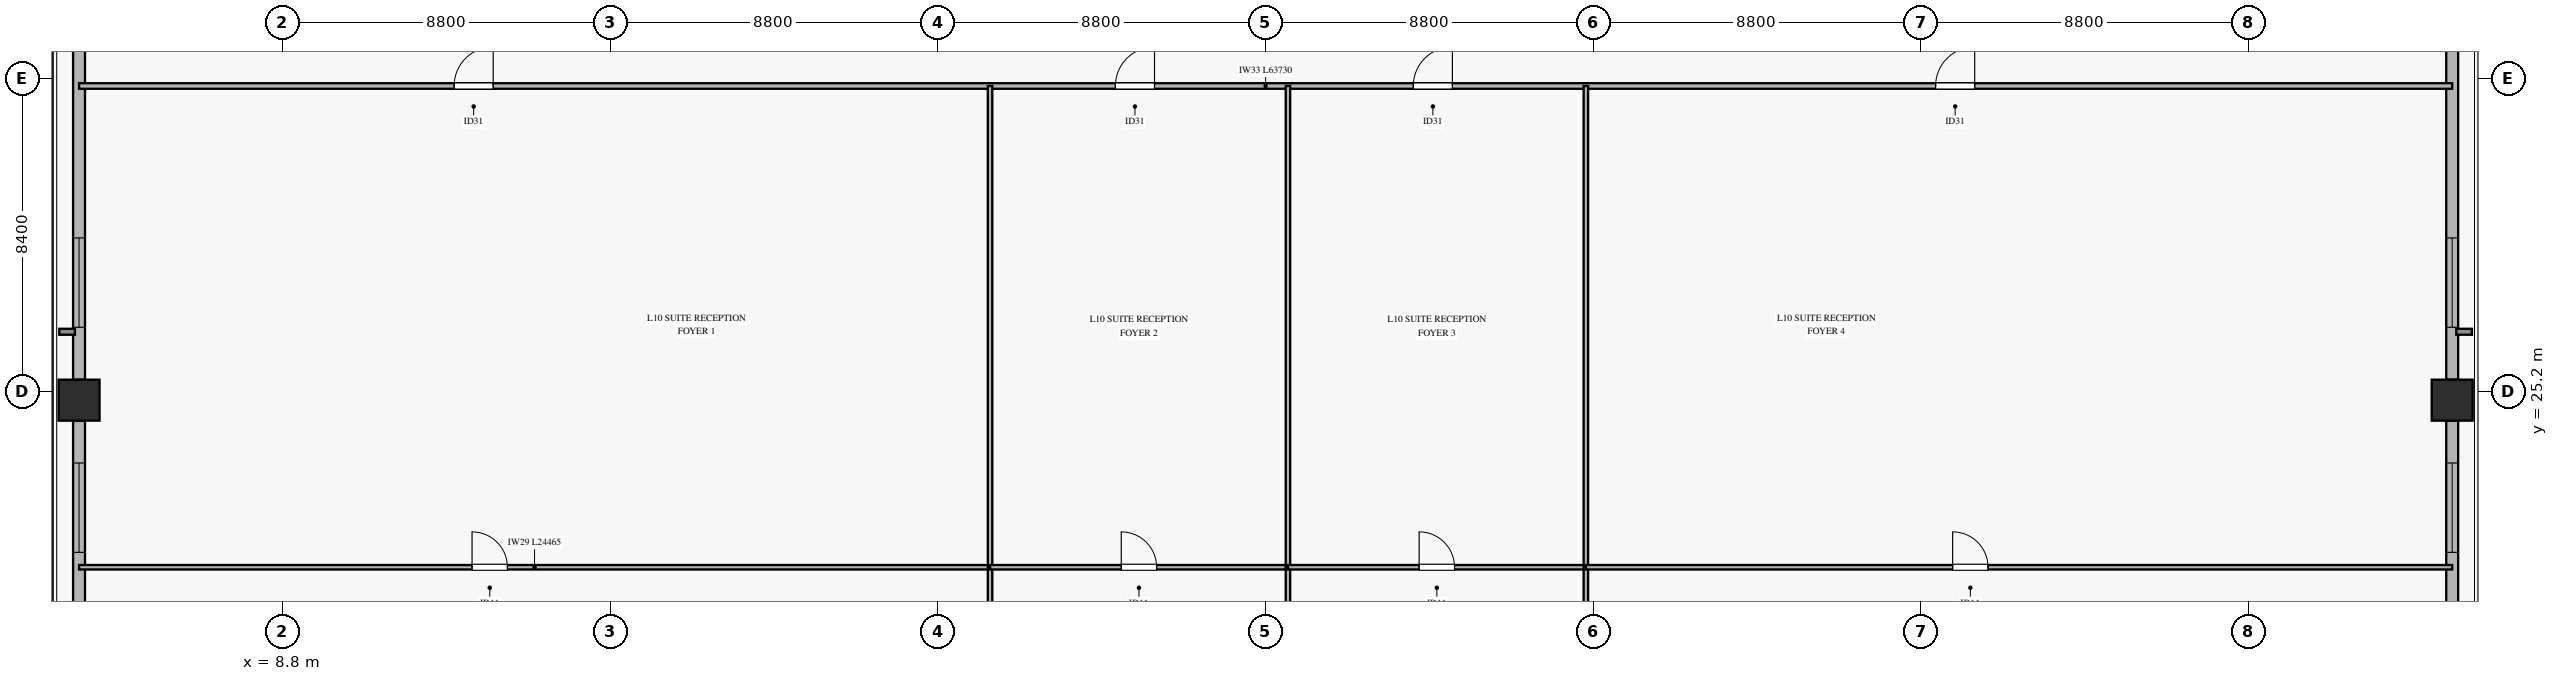
"""IFC4 building model, lengths in metres.
Left out: names, types, materials, properties, quantities, classifications, styles, units other than length and angle.
Written with IfcOpenShell. Run it as: python <this file> out.ifc"""

import sys

from ifc_helpers import new_model, si_unit, direction, frame, frame_2d, origin, origin_2d, place, context, subcontext, project, spatial, rectangle, hollow_rectangle, extrude, source, transform, mapped, element, fill, save


model = new_model("IFC4")
c1 = context("Model", 3, precision=1e-05, world=origin(), true_north=direction((0.0, 1.0)))
c2 = subcontext(c1, "Body", "Model", "MODEL_VIEW")
j1 = project(units=[si_unit("LENGTHUNIT", "METRE"), si_unit("PLANEANGLEUNIT", "RADIAN")], contexts=[c1])
p1 = place(None, origin())
s1 = spatial("IfcSite", under=j1, at=p1, CompositionType="ELEMENT")
p2 = place(p1, origin())
s2 = spatial("IfcBuilding", under=s1, at=p2, CompositionType="ELEMENT")
p3 = place(p2, frame((0.0, 0.0, 41.0)))
s3 = spatial("IfcBuildingStorey", under=s2, at=p3, CompositionType="ELEMENT", Elevation=41.0)
m1 = source(origin(), c2, "Body", "SweptSolid", [
    extrude(hollow_rectangle(XDim=1.1, YDim=1.1, WallThickness=0.05, at=origin_2d()), origin(), (0.0, 0.0, 1.0), 3.68),
])
for number, where, z_axis, x_axis in (
    (1, (3.335, 24.963, 0.0), (0.0, 0.0, 1.0), (1.0, 0.0, 0.0)),
    (2, (67.065, 24.963, 0.0), (0.0, 0.0, 1.0), (1.0, 0.0, 0.0)),
):
    element("IfcColumn", number, at=place(p3, frame(where, z_axis=z_axis, x_axis=x_axis)), inside=s3, PredefinedType="COLUMN", context=c2, shape_type="MappedRepresentation", body=[
        mapped(m1, transform((0.0, 0.0, 0.0), x_axis=(1.0, 0.0, 0.0), y_axis=(0.0, 1.0, 0.0), z_axis=(0.0, 0.0, 1.0), scale=1.0)),
    ])
p4 = place(p3, frame((3.335, 7.001, 0.0), z_axis=(0.0, 0.0, 1.0), x_axis=(0.0, 1.0, 0.0)))
e3 = element("IfcWall", 3, at=p4, inside=s3, PredefinedType="SOLIDWALL", context=c2, shape_type="SweptSolid", body=[
    extrude(rectangle(XDim=17.412, YDim=0.32, at=frame_2d((8.706, 0.0))), origin(), (0.0, 0.0, 1.0), 3.16),
])
p5 = place(p4, frame((3.567, 0.0, 0.45)))
e4 = element("IfcOpeningElement", 4, at=p5, cuts=e3, PredefinedType="OPENING", context=c2, shape_type="SweptSolid", body=[
    extrude(rectangle(XDim=2.4, YDim=2.1, at=frame_2d((1.2, 1.05))), frame((0.0, 0.17, 0.0), z_axis=(0.0, -1.0, 0.0), x_axis=(1.0, 0.0, 0.0)), (0.0, 0.0, 1.0), 0.34),
])
p6 = place(p4, frame((13.875, 0.0, 0.45)))
e5 = element("IfcOpeningElement", 5, at=p6, cuts=e3, PredefinedType="OPENING", context=c2, shape_type="SweptSolid", body=[
    extrude(rectangle(XDim=2.4, YDim=2.1, at=frame_2d((1.2, 1.05))), frame((0.0, 0.17, 0.0), z_axis=(0.0, -1.0, 0.0), x_axis=(1.0, 0.0, 0.0)), (0.0, 0.0, 1.0), 0.34),
])
p7 = place(p3, frame((3.335, 25.513, 0.0), z_axis=(0.0, 0.0, 1.0), x_axis=(0.0, 1.0, 0.0)))
e6 = element("IfcWall", 6, at=p7, inside=s3, PredefinedType="SOLIDWALL", context=c2, shape_type="SweptSolid", body=[
    extrude(rectangle(XDim=17.413, YDim=0.32, at=frame_2d((8.707, 0.0))), origin(), (0.0, 0.0, 1.0), 3.16),
])
p8 = place(p7, frame((1.407, 0.0, 0.45)))
e7 = element("IfcOpeningElement", 7, at=p8, cuts=e6, PredefinedType="OPENING", context=c2, shape_type="SweptSolid", body=[
    extrude(rectangle(XDim=2.4, YDim=2.1, at=frame_2d((1.2, 1.05))), frame((0.0, 0.17, 0.0), z_axis=(0.0, -1.0, 0.0), x_axis=(1.0, 0.0, 0.0)), (0.0, 0.0, 1.0), 0.34),
])
p9 = place(p7, frame((13.463, 0.0, 0.45)))
e8 = element("IfcOpeningElement", 8, at=p9, cuts=e6, PredefinedType="OPENING", context=c2, shape_type="SweptSolid", body=[
    extrude(rectangle(XDim=2.4, YDim=2.1, at=frame_2d((1.2, 1.05))), frame((0.0, 0.17, 0.0), z_axis=(0.0, -1.0, 0.0), x_axis=(1.0, 0.0, 0.0)), (0.0, 0.0, 1.0), 0.34),
])
p10 = place(p3, frame((67.065, 7.001, 0.0), z_axis=(0.0, 0.0, 1.0), x_axis=(0.0, 1.0, 0.0)))
e9 = element("IfcWall", 9, at=p10, inside=s3, PredefinedType="SOLIDWALL", context=c2, shape_type="SweptSolid", body=[
    extrude(rectangle(XDim=17.412, YDim=0.32, at=frame_2d((8.706, 0.0))), origin(), (0.0, 0.0, 1.0), 3.16),
])
p11 = place(p10, frame((3.567, 0.0, 0.45)))
e10 = element("IfcOpeningElement", 10, at=p11, cuts=e9, PredefinedType="OPENING", context=c2, shape_type="SweptSolid", body=[
    extrude(rectangle(XDim=2.4, YDim=2.1, at=frame_2d((1.2, 1.05))), frame((0.0, 0.17, 0.0), z_axis=(0.0, -1.0, 0.0), x_axis=(1.0, 0.0, 0.0)), (0.0, 0.0, 1.0), 0.34),
])
p12 = place(p10, frame((13.875, 0.0, 0.45)))
e11 = element("IfcOpeningElement", 11, at=p12, cuts=e9, PredefinedType="OPENING", context=c2, shape_type="SweptSolid", body=[
    extrude(rectangle(XDim=2.4, YDim=2.1, at=frame_2d((1.2, 1.05))), frame((0.0, 0.17, 0.0), z_axis=(0.0, -1.0, 0.0), x_axis=(1.0, 0.0, 0.0)), (0.0, 0.0, 1.0), 0.34),
])
p13 = place(p3, frame((67.065, 25.513, 0.0), z_axis=(0.0, 0.0, 1.0), x_axis=(0.0, 1.0, 0.0)))
e12 = element("IfcWall", 12, at=p13, inside=s3, PredefinedType="SOLIDWALL", context=c2, shape_type="SweptSolid", body=[
    extrude(rectangle(XDim=17.413, YDim=0.32, at=frame_2d((8.707, 0.0))), origin(), (0.0, 0.0, 1.0), 3.16),
])
p14 = place(p13, frame((1.407, 0.0, 0.45)))
e13 = element("IfcOpeningElement", 13, at=p14, cuts=e12, PredefinedType="OPENING", context=c2, shape_type="SweptSolid", body=[
    extrude(rectangle(XDim=2.4, YDim=2.1, at=frame_2d((1.2, 1.05))), frame((0.0, 0.17, 0.0), z_axis=(0.0, -1.0, 0.0), x_axis=(1.0, 0.0, 0.0)), (0.0, 0.0, 1.0), 0.34),
])
p15 = place(p13, frame((13.463, 0.0, 0.45)))
e14 = element("IfcOpeningElement", 14, at=p15, cuts=e12, PredefinedType="OPENING", context=c2, shape_type="SweptSolid", body=[
    extrude(rectangle(XDim=2.4, YDim=2.1, at=frame_2d((1.2, 1.05))), frame((0.0, 0.17, 0.0), z_axis=(0.0, -1.0, 0.0), x_axis=(1.0, 0.0, 0.0)), (0.0, 0.0, 1.0), 0.34),
])
p16 = place(p3, frame((3.335, 33.4, 0.0), z_axis=(0.0, 0.0, 1.0), x_axis=(1.0, 0.0, 0.0)))
e15 = element("IfcWall", 15, at=p16, inside=s3, PredefinedType="PARTITIONING", context=c2, shape_type="SweptSolid", body=[
    extrude(rectangle(XDim=63.73, YDim=0.15, at=frame_2d((31.865, 0.0))), origin(), (0.0, 0.0, 1.0), 2.765),
])
p17 = place(p16, frame((10.072, 0.0, 0.0)))
e16 = element("IfcOpeningElement", 16, at=p17, cuts=e15, PredefinedType="OPENING", context=c2, shape_type="SweptSolid", body=[
    extrude(rectangle(XDim=1.05, YDim=2.15, at=frame_2d((0.525, 1.075))), frame((0.0, 0.085, 0.0), z_axis=(0.0, -1.0, 0.0), x_axis=(1.0, 0.0, 0.0)), (0.0, 0.0, 1.0), 0.17),
])
p18 = place(p16, frame((27.831, 0.0, 0.0)))
e17 = element("IfcOpeningElement", 17, at=p18, cuts=e15, PredefinedType="OPENING", context=c2, shape_type="SweptSolid", body=[
    extrude(rectangle(XDim=1.05, YDim=2.15, at=frame_2d((0.525, 1.075))), frame((0.0, 0.085, 0.0), z_axis=(0.0, -1.0, 0.0), x_axis=(1.0, 0.0, 0.0)), (0.0, 0.0, 1.0), 0.17),
])
p19 = place(p16, frame((35.831, 0.0, 0.0)))
e18 = element("IfcOpeningElement", 18, at=p19, cuts=e15, PredefinedType="OPENING", context=c2, shape_type="SweptSolid", body=[
    extrude(rectangle(XDim=1.05, YDim=2.15, at=frame_2d((0.525, 1.075))), frame((0.0, 0.085, 0.0), z_axis=(0.0, -1.0, 0.0), x_axis=(1.0, 0.0, 0.0)), (0.0, 0.0, 1.0), 0.17),
])
p20 = place(p16, frame((49.857, 0.0, 0.0)))
e19 = element("IfcOpeningElement", 19, at=p20, cuts=e15, PredefinedType="OPENING", context=c2, shape_type="SweptSolid", body=[
    extrude(rectangle(XDim=1.05, YDim=2.15, at=frame_2d((0.525, 1.075))), frame((0.0, 0.085, 0.0), z_axis=(0.0, -1.0, 0.0), x_axis=(1.0, 0.0, 0.0)), (0.0, 0.0, 1.0), 0.17),
])
p21 = place(p3, frame((3.335, 20.476, 0.0), z_axis=(0.0, 0.0, 1.0), x_axis=(1.0, 0.0, 0.0)))
e20 = element("IfcWall", 20, at=p21, inside=s3, PredefinedType="PARTITIONING", context=c2, shape_type="SweptSolid", body=[
    extrude(rectangle(XDim=24.465, YDim=0.12, at=frame_2d((12.232, 0.0))), origin(), (0.0, 0.0, 1.0), 2.765),
])
p22 = place(p21, frame((10.554, 0.0, 0.0)))
e21 = element("IfcOpeningElement", 21, at=p22, cuts=e20, PredefinedType="OPENING", context=c2, shape_type="SweptSolid", body=[
    extrude(rectangle(XDim=0.95, YDim=2.1, at=frame_2d((0.475, 1.05))), frame((0.0, 0.07, 0.0), z_axis=(0.0, -1.0, 0.0), x_axis=(1.0, 0.0, 0.0)), (0.0, 0.0, 1.0), 0.14),
])
p23 = place(p3, frame((27.8, 3.827, 0.0), z_axis=(0.0, 0.0, 1.0), x_axis=(0.0, 1.0, 0.0)))
e22 = element("IfcWall", 22, at=p23, inside=s3, PredefinedType="PARTITIONING", context=c2, shape_type="SweptSolid", body=[
    extrude(rectangle(XDim=29.573, YDim=0.12, at=frame_2d((14.787, 0.0))), origin(), (0.0, 0.0, 1.0), 3.165),
])
p24 = place(p3, frame((27.8, 20.476, 0.0), z_axis=(0.0, 0.0, 1.0), x_axis=(1.0, 0.0, 0.0)))
e23 = element("IfcWall", 23, at=p24, inside=s3, PredefinedType="PARTITIONING", context=c2, shape_type="SweptSolid", body=[
    extrude(rectangle(XDim=8.0, YDim=0.12, at=frame_2d((4.0, 0.0))), origin(), (0.0, 0.0, 1.0), 2.765),
])
p25 = place(p24, frame((3.523, 0.0, 0.0)))
e24 = element("IfcOpeningElement", 24, at=p25, cuts=e23, PredefinedType="OPENING", context=c2, shape_type="SweptSolid", body=[
    extrude(rectangle(XDim=0.95, YDim=2.1, at=frame_2d((0.475, 1.05))), frame((0.0, 0.07, 0.0), z_axis=(0.0, -1.0, 0.0), x_axis=(1.0, 0.0, 0.0)), (0.0, 0.0, 1.0), 0.14),
])
p26 = place(p3, frame((35.8, 3.827, 0.0), z_axis=(0.0, 0.0, 1.0), x_axis=(0.0, 1.0, 0.0)))
e25 = element("IfcWall", 25, at=p26, inside=s3, PredefinedType="PARTITIONING", context=c2, shape_type="SweptSolid", body=[
    extrude(rectangle(XDim=29.573, YDim=0.12, at=frame_2d((14.787, 0.0))), origin(), (0.0, 0.0, 1.0), 3.165),
])
p27 = place(p3, frame((35.8, 20.476, 0.0), z_axis=(0.0, 0.0, 1.0), x_axis=(1.0, 0.0, 0.0)))
e26 = element("IfcWall", 26, at=p27, inside=s3, PredefinedType="PARTITIONING", context=c2, shape_type="SweptSolid", body=[
    extrude(rectangle(XDim=8.0, YDim=0.12, at=frame_2d((4.0, 0.0))), origin(), (0.0, 0.0, 1.0), 2.765),
])
p28 = place(p27, frame((3.523, 0.0, 0.0)))
e27 = element("IfcOpeningElement", 27, at=p28, cuts=e26, PredefinedType="OPENING", context=c2, shape_type="SweptSolid", body=[
    extrude(rectangle(XDim=0.95, YDim=2.1, at=frame_2d((0.475, 1.05))), frame((0.0, 0.07, 0.0), z_axis=(0.0, -1.0, 0.0), x_axis=(1.0, 0.0, 0.0)), (0.0, 0.0, 1.0), 0.14),
])
p29 = place(p3, frame((43.8, 3.827, 0.0), z_axis=(0.0, 0.0, 1.0), x_axis=(0.0, 1.0, 0.0)))
e28 = element("IfcWall", 28, at=p29, inside=s3, PredefinedType="PARTITIONING", context=c2, shape_type="SweptSolid", body=[
    extrude(rectangle(XDim=29.573, YDim=0.12, at=frame_2d((14.787, 0.0))), origin(), (0.0, 0.0, 1.0), 3.215),
])
p30 = place(p3, frame((43.8, 20.476, 0.0), z_axis=(0.0, 0.0, 1.0), x_axis=(1.0, 0.0, 0.0)))
e29 = element("IfcWall", 29, at=p30, inside=s3, PredefinedType="PARTITIONING", context=c2, shape_type="SweptSolid", body=[
    extrude(rectangle(XDim=23.265, YDim=0.12, at=frame_2d((11.632, 0.0))), origin(), (0.0, 0.0, 1.0), 2.765),
])
p31 = place(p30, frame((9.85, 0.0, 0.0)))
e30 = element("IfcOpeningElement", 30, at=p31, cuts=e29, PredefinedType="OPENING", context=c2, shape_type="SweptSolid", body=[
    extrude(rectangle(XDim=0.95, YDim=2.1, at=frame_2d((0.475, 1.05))), frame((0.0, 0.07, 0.0), z_axis=(0.0, -1.0, 0.0), x_axis=(1.0, 0.0, 0.0)), (0.0, 0.0, 1.0), 0.14),
])
m2 = source(origin(), c2, "Body", "SweptSolid", [
    extrude(rectangle(XDim=2.4, YDim=2.1, at=frame_2d((1.2, 1.05))), frame((0.0, 0.03, 0.0), z_axis=(0.0, -1.0, 0.0), x_axis=(1.0, 0.0, 0.0)), (0.0, 0.0, 1.0), 0.06),
])
p32 = place(p6, origin())
e31 = element("IfcWindow", 31, at=p32, inside=s3, PartitioningType="SINGLE_PANEL", PredefinedType="WINDOW", context=c2, shape_type="MappedRepresentation", body=[
    mapped(m2, transform((0.0, 0.0, 0.0), x_axis=(1.0, 0.0, 0.0), y_axis=(0.0, 1.0, 0.0), z_axis=(0.0, 0.0, 1.0), scale=1.0)),
])
fill(e5, e31)
p33 = place(p8, origin())
e32 = element("IfcWindow", 32, at=p33, inside=s3, PartitioningType="SINGLE_PANEL", PredefinedType="WINDOW", context=c2, shape_type="MappedRepresentation", body=[
    mapped(m2, transform((0.0, 0.0, 0.0), x_axis=(1.0, 0.0, 0.0), y_axis=(0.0, 1.0, 0.0), z_axis=(0.0, 0.0, 1.0), scale=1.0)),
])
fill(e7, e32)
p34 = place(p12, origin())
e33 = element("IfcWindow", 33, at=p34, inside=s3, PartitioningType="SINGLE_PANEL", PredefinedType="WINDOW", context=c2, shape_type="MappedRepresentation", body=[
    mapped(m2, transform((0.0, 0.0, 0.0), x_axis=(1.0, 0.0, 0.0), y_axis=(0.0, 1.0, 0.0), z_axis=(0.0, 0.0, 1.0), scale=1.0)),
])
fill(e11, e33)
p35 = place(p14, origin())
e34 = element("IfcWindow", 34, at=p35, inside=s3, PartitioningType="SINGLE_PANEL", PredefinedType="WINDOW", context=c2, shape_type="MappedRepresentation", body=[
    mapped(m2, transform((0.0, 0.0, 0.0), x_axis=(1.0, 0.0, 0.0), y_axis=(0.0, 1.0, 0.0), z_axis=(0.0, 0.0, 1.0), scale=1.0)),
])
fill(e13, e34)
m3 = source(origin(), c2, "Body", "SweptSolid", [
    extrude(rectangle(XDim=1.05, YDim=2.15, at=frame_2d((0.525, 1.075))), frame((0.0, 0.025, 0.0), z_axis=(0.0, -1.0, 0.0), x_axis=(1.0, 0.0, 0.0)), (0.0, 0.0, 1.0), 0.05),
])
p36 = place(p17, origin())
e35 = element("IfcDoor", 35, at=p36, inside=s3, OperationType="SINGLE_SWING_RIGHT", PredefinedType="DOOR", context=c2, shape_type="MappedRepresentation", body=[
    mapped(m3, transform((0.0, 0.0, 0.0), x_axis=(1.0, 0.0, 0.0), y_axis=(0.0, 1.0, 0.0), z_axis=(0.0, 0.0, 1.0), scale=1.0)),
])
fill(e16, e35)
m4 = source(origin(), c2, "Body", "SweptSolid", [
    extrude(rectangle(XDim=0.95, YDim=2.1, at=frame_2d((0.475, 1.05))), frame((0.0, 0.025, 0.0), z_axis=(0.0, -1.0, 0.0), x_axis=(1.0, 0.0, 0.0)), (0.0, 0.0, 1.0), 0.05),
])
p37 = place(p22, origin())
e36 = element("IfcDoor", 36, at=p37, inside=s3, OperationType="SINGLE_SWING_LEFT", PredefinedType="DOOR", context=c2, shape_type="MappedRepresentation", body=[
    mapped(m4, transform((0.0, 0.0, 0.0), x_axis=(1.0, 0.0, 0.0), y_axis=(0.0, 1.0, 0.0), z_axis=(0.0, 0.0, 1.0), scale=1.0)),
])
fill(e21, e36)
p38 = place(p18, origin())
e37 = element("IfcDoor", 37, at=p38, inside=s3, OperationType="SINGLE_SWING_RIGHT", PredefinedType="DOOR", context=c2, shape_type="MappedRepresentation", body=[
    mapped(m3, transform((0.0, 0.0, 0.0), x_axis=(1.0, 0.0, 0.0), y_axis=(0.0, 1.0, 0.0), z_axis=(0.0, 0.0, 1.0), scale=1.0)),
])
fill(e17, e37)
p39 = place(p25, origin())
e38 = element("IfcDoor", 38, at=p39, inside=s3, OperationType="SINGLE_SWING_LEFT", PredefinedType="DOOR", context=c2, shape_type="MappedRepresentation", body=[
    mapped(m4, transform((0.0, 0.0, 0.0), x_axis=(1.0, 0.0, 0.0), y_axis=(0.0, 1.0, 0.0), z_axis=(0.0, 0.0, 1.0), scale=1.0)),
])
fill(e24, e38)
p40 = place(p19, origin())
e39 = element("IfcDoor", 39, at=p40, inside=s3, OperationType="SINGLE_SWING_RIGHT", PredefinedType="DOOR", context=c2, shape_type="MappedRepresentation", body=[
    mapped(m3, transform((0.0, 0.0, 0.0), x_axis=(1.0, 0.0, 0.0), y_axis=(0.0, 1.0, 0.0), z_axis=(0.0, 0.0, 1.0), scale=1.0)),
])
fill(e18, e39)
p41 = place(p28, origin())
e40 = element("IfcDoor", 40, at=p41, inside=s3, OperationType="SINGLE_SWING_LEFT", PredefinedType="DOOR", context=c2, shape_type="MappedRepresentation", body=[
    mapped(m4, transform((0.0, 0.0, 0.0), x_axis=(1.0, 0.0, 0.0), y_axis=(0.0, 1.0, 0.0), z_axis=(0.0, 0.0, 1.0), scale=1.0)),
])
fill(e27, e40)
p42 = place(p20, origin())
e41 = element("IfcDoor", 41, at=p42, inside=s3, OperationType="SINGLE_SWING_RIGHT", PredefinedType="DOOR", context=c2, shape_type="MappedRepresentation", body=[
    mapped(m3, transform((0.0, 0.0, 0.0), x_axis=(1.0, 0.0, 0.0), y_axis=(0.0, 1.0, 0.0), z_axis=(0.0, 0.0, 1.0), scale=1.0)),
])
fill(e19, e41)
p43 = place(p31, origin())
e42 = element("IfcDoor", 42, at=p43, inside=s3, OperationType="SINGLE_SWING_LEFT", PredefinedType="DOOR", context=c2, shape_type="MappedRepresentation", body=[
    mapped(m4, transform((0.0, 0.0, 0.0), x_axis=(1.0, 0.0, 0.0), y_axis=(0.0, 1.0, 0.0), z_axis=(0.0, 0.0, 1.0), scale=1.0)),
])
fill(e30, e42)
save(model, sys.argv[1])
